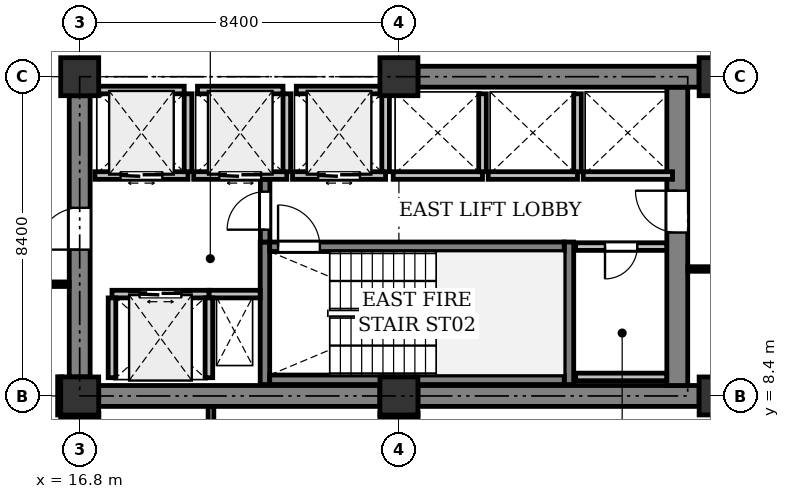
"""IFC4 building model, lengths in metres.
Left out: names, types, materials, properties, quantities, classifications, styles, units other than length and angle.
Written with IfcOpenShell. Run it as: python <this file> out.ifc"""

import sys

from ifc_helpers import new_model, si_unit, direction, frame, frame_2d, origin, origin_2d, place, context, subcontext, project, spatial, rectangle, extrude, element, fill, save


model = new_model("IFC4")
c1 = context("Model", 3, precision=1e-05, world=origin(), true_north=direction((0.0, 1.0)))
c2 = subcontext(c1, "Body", "Model", "MODEL_VIEW")
j1 = project(units=[si_unit("LENGTHUNIT", "METRE"), si_unit("PLANEANGLEUNIT", "RADIAN")], contexts=[c1])
p1 = place(None, origin())
s1 = spatial("IfcSite", under=j1, at=p1, CompositionType="ELEMENT")
p2 = place(p1, origin())
s2 = spatial("IfcBuilding", under=s1, at=p2, CompositionType="ELEMENT")
p3 = place(p2, frame((0.0, 0.0, 167.3)))
s3 = spatial("IfcBuildingStorey", under=s2, at=p3, CompositionType="ELEMENT", Elevation=167.3)
for number, where, z_axis, x_axis in (
    (1, (16.8, 8.4, 0.0), (0.0, 0.0, 1.0), (1.0, 0.0, 0.0)),
    (2, (16.8, 16.8, 0.0), (0.0, 0.0, 1.0), (1.0, 0.0, 0.0)),
    (3, (25.2, 8.4, 0.0), (0.0, 0.0, 1.0), (1.0, 0.0, 0.0)),
    (4, (25.2, 16.8, 0.0), (0.0, 0.0, 1.0), (1.0, 0.0, 0.0)),
    (5, (33.6, 8.4, 0.0), (0.0, 0.0, 1.0), (1.0, 0.0, 0.0)),
    (6, (33.6, 16.8, 0.0), (0.0, 0.0, 1.0), (1.0, 0.0, 0.0)),
):
    element("IfcColumn", number, at=place(p3, frame(where, z_axis=z_axis, x_axis=x_axis)), inside=s3, PredefinedType="COLUMN", context=c2, shape_type="SweptSolid", body=[
        extrude(rectangle(XDim=1.0, YDim=1.0, at=origin_2d()), origin(), (0.0, 0.0, 1.0), 4.1),
    ])
p4 = place(p3, frame((17.3, 8.4, 0.0), z_axis=(0.0, 0.0, 1.0), x_axis=(1.0, 0.0, 0.0)))
e7 = element("IfcWall", 7, at=p4, inside=s3, PredefinedType="SHEAR", context=c2, shape_type="SweptSolid", body=[
    extrude(rectangle(XDim=7.4, YDim=0.55, at=frame_2d((3.7, 0.0))), origin(), (0.0, 0.0, 1.0), 3.825),
])
p5 = place(p3, frame((25.7, 8.4, 0.0), z_axis=(0.0, 0.0, 1.0), x_axis=(1.0, 0.0, 0.0)))
e8 = element("IfcWall", 8, at=p5, inside=s3, PredefinedType="SHEAR", context=c2, shape_type="SweptSolid", body=[
    extrude(rectangle(XDim=7.4, YDim=0.55, at=frame_2d((3.7, 0.0))), origin(), (0.0, 0.0, 1.0), 3.825),
])
p6 = place(p3, frame((32.525, 8.675, 0.0), z_axis=(0.0, 0.0, 1.0), x_axis=(0.0, 1.0, 0.0)))
e9 = element("IfcWall", 9, at=p6, inside=s3, PredefinedType="SHEAR", context=c2, shape_type="SweptSolid", body=[
    extrude(rectangle(XDim=7.85, YDim=0.55, at=frame_2d((3.925, 0.0))), origin(), (0.0, 0.0, 1.0), 3.825),
])
p7 = place(p6, frame((4.025, 0.0, 0.0)))
e10 = element("IfcOpeningElement", 10, at=p7, cuts=e9, PredefinedType="OPENING", context=c2, shape_type="SweptSolid", body=[
    extrude(rectangle(XDim=1.1, YDim=2.15, at=frame_2d((0.55, 1.075))), frame((0.0, 0.285, 0.0), z_axis=(0.0, -1.0, 0.0), x_axis=(1.0, 0.0, 0.0)), (0.0, 0.0, 1.0), 0.57),
])
p8 = place(p3, frame((16.8, 8.9, 0.0), z_axis=(0.0, 0.0, 1.0), x_axis=(0.0, 1.0, 0.0)))
e11 = element("IfcWall", 11, at=p8, inside=s3, PredefinedType="SHEAR", context=c2, shape_type="SweptSolid", body=[
    extrude(rectangle(XDim=7.4, YDim=0.55, at=frame_2d((3.7, 0.0))), origin(), (0.0, 0.0, 1.0), 3.825),
])
p9 = place(p8, frame((3.35, 0.0, 0.0)))
e12 = element("IfcOpeningElement", 12, at=p9, cuts=e11, PredefinedType="OPENING", context=c2, shape_type="SweptSolid", body=[
    extrude(rectangle(XDim=1.1, YDim=2.15, at=frame_2d((0.55, 1.075))), frame((0.0, 0.285, 0.0), z_axis=(0.0, -1.0, 0.0), x_axis=(1.0, 0.0, 0.0)), (0.0, 0.0, 1.0), 0.57),
])
p10 = place(p3, frame((25.7, 16.8, 0.0), z_axis=(0.0, 0.0, 1.0), x_axis=(1.0, 0.0, 0.0)))
e13 = element("IfcWall", 13, at=p10, inside=s3, PredefinedType="SHEAR", context=c2, shape_type="SweptSolid", body=[
    extrude(rectangle(XDim=7.4, YDim=0.55, at=frame_2d((3.7, 0.0))), origin(), (0.0, 0.0, 1.0), 3.825),
])
for number, where, z_axis, x_axis in (
    (14, (21.675, 8.7, 0.0), (0.0, 0.0, 1.0), (0.0, 1.0, 0.0)),
    (15, (29.675, 8.7, 0.0), (0.0, 0.0, 1.0), (0.0, 1.0, 0.0)),
):
    element("IfcWall", number, at=place(p3, frame(where, z_axis=z_axis, x_axis=x_axis)), inside=s3, PredefinedType="SHEAR", context=c2, shape_type="SweptSolid", body=[
        extrude(rectangle(XDim=3.75, YDim=0.25, at=frame_2d((1.875, 0.0))), origin(), (0.0, 0.0, 1.0), 3.825),
    ])
p11 = place(p3, frame((21.8, 8.825, 0.0), z_axis=(0.0, 0.0, 1.0), x_axis=(1.0, 0.0, 0.0)))
e16 = element("IfcWall", 16, at=p11, inside=s3, PredefinedType="SHEAR", context=c2, shape_type="SweptSolid", body=[
    extrude(rectangle(XDim=7.75, YDim=0.25, at=frame_2d((3.875, 0.0))), origin(), (0.0, 0.0, 1.0), 3.825),
])
p12 = place(p3, frame((21.8, 12.325, 0.0), z_axis=(0.0, 0.0, 1.0), x_axis=(1.0, 0.0, 0.0)))
e17 = element("IfcWall", 17, at=p12, inside=s3, PredefinedType="SHEAR", context=c2, shape_type="SweptSolid", body=[
    extrude(rectangle(XDim=7.75, YDim=0.25, at=frame_2d((3.875, 0.0))), origin(), (0.0, 0.0, 1.0), 3.825),
])
p13 = place(p12, frame((0.22, 0.0, 0.0)))
e18 = element("IfcOpeningElement", 18, at=p13, cuts=e17, PredefinedType="OPENING", context=c2, shape_type="SweptSolid", body=[
    extrude(rectangle(XDim=1.1, YDim=2.15, at=frame_2d((0.55, 1.075))), frame((0.0, 0.135, 0.0), z_axis=(0.0, -1.0, 0.0), x_axis=(1.0, 0.0, 0.0)), (0.0, 0.0, 1.0), 0.27),
])
p14 = place(p3, frame((20.2, 11.08, 0.0), z_axis=(0.0, 0.0, 1.0), x_axis=(1.0, 0.0, 0.0)))
e19 = element("IfcWall", 19, at=p14, inside=s3, PredefinedType="PARTITIONING", context=c2, shape_type="SweptSolid", body=[
    extrude(rectangle(XDim=1.35, YDim=0.2, at=frame_2d((0.675, 0.0))), origin(), (0.0, 0.0, 1.0), 3.825),
])
p15 = place(p3, frame((21.68, 12.45, 0.0), z_axis=(0.0, 0.0, 1.0), x_axis=(0.0, 1.0, 0.0)))
e20 = element("IfcWall", 20, at=p15, inside=s3, PredefinedType="SHEAR", context=c2, shape_type="SweptSolid", body=[
    extrude(rectangle(XDim=1.65, YDim=0.25, at=frame_2d((0.825, 0.0))), origin(), (0.0, 0.0, 1.0), 3.825),
])
p16 = place(p15, frame((0.325, 0.0, 0.0)))
e21 = element("IfcOpeningElement", 21, at=p16, cuts=e20, PredefinedType="OPENING", context=c2, shape_type="SweptSolid", body=[
    extrude(rectangle(XDim=1.0, YDim=2.15, at=frame_2d((0.5, 1.075))), frame((0.0, 0.135, 0.0), z_axis=(0.0, -1.0, 0.0), x_axis=(1.0, 0.0, 0.0)), (0.0, 0.0, 1.0), 0.27),
])
p17 = place(p3, frame((17.65, 11.08, 0.0), z_axis=(0.0, 0.0, 1.0), x_axis=(1.0, 0.0, 0.0)))
e22 = element("IfcWall", 22, at=p17, inside=s3, PredefinedType="PARTITIONING", context=c2, shape_type="SweptSolid", body=[
    extrude(rectangle(XDim=2.55, YDim=0.2, at=frame_2d((1.275, 0.0))), origin(), (0.0, 0.0, 1.0), 3.825),
])
p18 = place(p17, frame((0.725, 0.0, 0.0)))
e23 = element("IfcOpeningElement", 23, at=p18, cuts=e22, PredefinedType="OPENING", context=c2, shape_type="SweptSolid", body=[
    extrude(rectangle(XDim=1.1, YDim=2.2, at=frame_2d((0.55, 1.1))), frame((0.0, 0.11, 0.0), z_axis=(0.0, -1.0, 0.0), x_axis=(1.0, 0.0, 0.0)), (0.0, 0.0, 1.0), 0.22),
])
for number, where, z_axis, x_axis in (
    (24, (20.2, 8.88, 0.0), (0.0, 0.0, 1.0), (0.0, 1.0, 0.0)),
    (25, (17.65, 8.88, 0.0), (0.0, 0.0, 1.0), (0.0, 1.0, 0.0)),
):
    element("IfcWall", number, at=place(p3, frame(where, z_axis=z_axis, x_axis=x_axis)), inside=s3, PredefinedType="PARTITIONING", context=c2, shape_type="SweptSolid", body=[
        extrude(rectangle(XDim=2.1, YDim=0.2, at=frame_2d((1.05, 0.0))), origin(), (0.0, 0.0, 1.0), 3.825),
    ])
p19 = place(p3, frame((17.2, 14.2, 0.0), z_axis=(0.0, 0.0, 1.0), x_axis=(1.0, 0.0, 0.0)))
e26 = element("IfcWall", 26, at=p19, inside=s3, PredefinedType="PARTITIONING", context=c2, shape_type="SweptSolid", body=[
    extrude(rectangle(XDim=2.45, YDim=0.2, at=frame_2d((1.225, 0.0))), origin(), (0.0, 0.0, 1.0), 3.825),
])
p20 = place(p19, frame((0.675, 0.0, 0.0)))
e27 = element("IfcOpeningElement", 27, at=p20, cuts=e26, PredefinedType="OPENING", context=c2, shape_type="SweptSolid", body=[
    extrude(rectangle(XDim=1.1, YDim=2.2, at=frame_2d((0.55, 1.1))), frame((0.0, 0.11, 0.0), z_axis=(0.0, -1.0, 0.0), x_axis=(1.0, 0.0, 0.0)), (0.0, 0.0, 1.0), 0.22),
])
p21 = place(p3, frame((19.65, 14.3, 0.0), z_axis=(0.0, 0.0, 1.0), x_axis=(0.0, 1.0, 0.0)))
e28 = element("IfcWall", 28, at=p21, inside=s3, PredefinedType="PARTITIONING", context=c2, shape_type="SweptSolid", body=[
    extrude(rectangle(XDim=2.05, YDim=0.2, at=frame_2d((1.025, 0.0))), origin(), (0.0, 0.0, 1.0), 3.825),
])
p22 = place(p3, frame((17.3, 16.45, 0.0), z_axis=(0.0, 0.0, 1.0), x_axis=(1.0, 0.0, 0.0)))
e29 = element("IfcWall", 29, at=p22, inside=s3, PredefinedType="PARTITIONING", context=c2, shape_type="SweptSolid", body=[
    extrude(rectangle(XDim=2.25, YDim=0.2, at=frame_2d((1.125, 0.0))), origin(), (0.0, 0.0, 1.0), 3.825),
])
p23 = place(p3, frame((19.8, 14.2, 0.0), z_axis=(0.0, 0.0, 1.0), x_axis=(1.0, 0.0, 0.0)))
e30 = element("IfcWall", 30, at=p23, inside=s3, PredefinedType="PARTITIONING", context=c2, shape_type="SweptSolid", body=[
    extrude(rectangle(XDim=2.45, YDim=0.2, at=frame_2d((1.225, 0.0))), origin(), (0.0, 0.0, 1.0), 3.825),
])
p24 = place(p23, frame((0.675, 0.0, 0.0)))
e31 = element("IfcOpeningElement", 31, at=p24, cuts=e30, PredefinedType="OPENING", context=c2, shape_type="SweptSolid", body=[
    extrude(rectangle(XDim=1.1, YDim=2.2, at=frame_2d((0.55, 1.1))), frame((0.0, 0.11, 0.0), z_axis=(0.0, -1.0, 0.0), x_axis=(1.0, 0.0, 0.0)), (0.0, 0.0, 1.0), 0.22),
])
p25 = place(p3, frame((22.25, 14.3, 0.0), z_axis=(0.0, 0.0, 1.0), x_axis=(0.0, 1.0, 0.0)))
e32 = element("IfcWall", 32, at=p25, inside=s3, PredefinedType="PARTITIONING", context=c2, shape_type="SweptSolid", body=[
    extrude(rectangle(XDim=2.05, YDim=0.2, at=frame_2d((1.025, 0.0))), origin(), (0.0, 0.0, 1.0), 3.825),
])
p26 = place(p3, frame((19.9, 16.45, 0.0), z_axis=(0.0, 0.0, 1.0), x_axis=(1.0, 0.0, 0.0)))
e33 = element("IfcWall", 33, at=p26, inside=s3, PredefinedType="PARTITIONING", context=c2, shape_type="SweptSolid", body=[
    extrude(rectangle(XDim=2.25, YDim=0.2, at=frame_2d((1.125, 0.0))), origin(), (0.0, 0.0, 1.0), 3.825),
])
p27 = place(p3, frame((22.4, 14.2, 0.0), z_axis=(0.0, 0.0, 1.0), x_axis=(1.0, 0.0, 0.0)))
e34 = element("IfcWall", 34, at=p27, inside=s3, PredefinedType="PARTITIONING", context=c2, shape_type="SweptSolid", body=[
    extrude(rectangle(XDim=2.45, YDim=0.2, at=frame_2d((1.225, 0.0))), origin(), (0.0, 0.0, 1.0), 3.825),
])
p28 = place(p27, frame((0.675, 0.0, 0.0)))
e35 = element("IfcOpeningElement", 35, at=p28, cuts=e34, PredefinedType="OPENING", context=c2, shape_type="SweptSolid", body=[
    extrude(rectangle(XDim=1.1, YDim=2.2, at=frame_2d((0.55, 1.1))), frame((0.0, 0.11, 0.0), z_axis=(0.0, -1.0, 0.0), x_axis=(1.0, 0.0, 0.0)), (0.0, 0.0, 1.0), 0.22),
])
p29 = place(p3, frame((24.85, 14.3, 0.0), z_axis=(0.0, 0.0, 1.0), x_axis=(0.0, 1.0, 0.0)))
e36 = element("IfcWall", 36, at=p29, inside=s3, PredefinedType="PARTITIONING", context=c2, shape_type="SweptSolid", body=[
    extrude(rectangle(XDim=2.05, YDim=0.2, at=frame_2d((1.025, 0.0))), origin(), (0.0, 0.0, 1.0), 3.825),
])
p30 = place(p3, frame((22.5, 16.45, 0.0), z_axis=(0.0, 0.0, 1.0), x_axis=(1.0, 0.0, 0.0)))
e37 = element("IfcWall", 37, at=p30, inside=s3, PredefinedType="PARTITIONING", context=c2, shape_type="SweptSolid", body=[
    extrude(rectangle(XDim=2.25, YDim=0.2, at=frame_2d((1.125, 0.0))), origin(), (0.0, 0.0, 1.0), 3.825),
])
p31 = place(p3, frame((25.05, 14.2, 0.0), z_axis=(0.0, 0.0, 1.0), x_axis=(1.0, 0.0, 0.0)))
e38 = element("IfcWall", 38, at=p31, inside=s3, PredefinedType="PARTITIONING", context=c2, shape_type="SweptSolid", body=[
    extrude(rectangle(XDim=2.35, YDim=0.2, at=frame_2d((1.175, 0.0))), origin(), (0.0, 0.0, 1.0), 3.825),
])
p32 = place(p3, frame((27.4, 14.3, 0.0), z_axis=(0.0, 0.0, 1.0), x_axis=(0.0, 1.0, 0.0)))
e39 = element("IfcWall", 39, at=p32, inside=s3, PredefinedType="PARTITIONING", context=c2, shape_type="SweptSolid", body=[
    extrude(rectangle(XDim=2.05, YDim=0.2, at=frame_2d((1.025, 0.0))), origin(), (0.0, 0.0, 1.0), 3.825),
])
p33 = place(p3, frame((27.55, 14.2, 0.0), z_axis=(0.0, 0.0, 1.0), x_axis=(1.0, 0.0, 0.0)))
e40 = element("IfcWall", 40, at=p33, inside=s3, PredefinedType="PARTITIONING", context=c2, shape_type="SweptSolid", body=[
    extrude(rectangle(XDim=2.35, YDim=0.2, at=frame_2d((1.175, 0.0))), origin(), (0.0, 0.0, 1.0), 3.825),
])
p34 = place(p3, frame((29.9, 14.3, 0.0), z_axis=(0.0, 0.0, 1.0), x_axis=(0.0, 1.0, 0.0)))
e41 = element("IfcWall", 41, at=p34, inside=s3, PredefinedType="PARTITIONING", context=c2, shape_type="SweptSolid", body=[
    extrude(rectangle(XDim=2.05, YDim=0.2, at=frame_2d((1.025, 0.0))), origin(), (0.0, 0.0, 1.0), 3.825),
])
p35 = place(p3, frame((30.05, 14.2, 0.0), z_axis=(0.0, 0.0, 1.0), x_axis=(1.0, 0.0, 0.0)))
e42 = element("IfcWall", 42, at=p35, inside=s3, PredefinedType="PARTITIONING", context=c2, shape_type="SweptSolid", body=[
    extrude(rectangle(XDim=2.35, YDim=0.2, at=frame_2d((1.175, 0.0))), origin(), (0.0, 0.0, 1.0), 3.825),
])
p36 = place(p3, frame((32.246, 12.33, 0.0), z_axis=(0.0, 0.0, 1.0), x_axis=(-1.0, 0.0, 0.0)))
e43 = element("IfcWall", 43, at=p36, inside=s3, PredefinedType="PARTITIONING", context=c2, shape_type="SweptSolid", body=[
    extrude(rectangle(XDim=2.396, YDim=0.2, at=frame_2d((1.198, 0.0))), origin(), (0.0, 0.0, 1.0), 3.825),
])
p37 = place(p36, frame((0.773, 0.0, 0.0)))
e44 = element("IfcOpeningElement", 44, at=p37, cuts=e43, PredefinedType="OPENING", context=c2, shape_type="SweptSolid", body=[
    extrude(rectangle(XDim=0.85, YDim=2.15, at=frame_2d((0.425, 1.075))), frame((0.0, 0.11, 0.0), z_axis=(0.0, -1.0, 0.0), x_axis=(1.0, 0.0, 0.0)), (0.0, 0.0, 1.0), 0.22),
])
p38 = place(p3, frame((29.85, 8.9, 0.0), z_axis=(0.0, 0.0, 1.0), x_axis=(1.0, 0.0, 0.0)))
e45 = element("IfcWall", 45, at=p38, inside=s3, PredefinedType="PARTITIONING", context=c2, shape_type="SweptSolid", body=[
    extrude(rectangle(XDim=2.396, YDim=0.2, at=frame_2d((1.198, 0.0))), origin(), (0.0, 0.0, 1.0), 3.825),
])
p39 = place(p3, frame((20.254, 0.124, 0.0), z_axis=(0.0, 0.0, 1.0), x_axis=(0.0, 1.0, 0.0)))
e46 = element("IfcWall", 46, at=p39, inside=s3, PredefinedType="PARTITIONING", context=c2, shape_type="SweptSolid", body=[
    extrude(rectangle(XDim=7.997, YDim=0.15, at=frame_2d((3.999, 0.0))), origin(), (0.0, 0.0, 1.0), 3.825),
])
p40 = place(p3, frame((17.304, 7.88, 0.0), z_axis=(0.0, 0.0, 1.0), x_axis=(-0.999999881717, -0.000486381265, 0.0)))
e47 = element("IfcWall", 47, at=p40, inside=s3, PredefinedType="PARTITIONING", context=c2, shape_type="SweptSolid", body=[
    extrude(rectangle(XDim=1.004, YDim=0.12, at=frame_2d((0.502, 0.0))), origin(), (0.0, 0.0, 1.0), 3.371),
])
p41 = place(p3, frame((16.28, 7.9, 0.0), z_axis=(0.0, 0.0, 1.0), x_axis=(0.000486381265, 0.999999881717, 0.0)))
e48 = element("IfcWall", 48, at=p41, inside=s3, PredefinedType="PARTITIONING", context=c2, shape_type="SweptSolid", body=[
    extrude(rectangle(XDim=1.004, YDim=0.12, at=frame_2d((0.502, 0.0))), origin(), (0.0, 0.0, 1.0), 2.425),
])
p42 = place(p3, frame((16.521, 11.34, 0.0), z_axis=(0.0, 0.0, 1.0), x_axis=(-1.0, 0.0, 0.0)))
e49 = element("IfcWall", 49, at=p42, inside=s3, PredefinedType="PARTITIONING", context=c2, shape_type="SweptSolid", body=[
    extrude(rectangle(XDim=2.121, YDim=0.12, at=frame_2d((1.061, 0.0))), origin(), (0.0, 0.0, 1.0), 3.825),
])
p43 = place(p3, frame((25.704, 7.88, 0.0), z_axis=(0.0, 0.0, 1.0), x_axis=(-0.999999881717, -0.000486381265, 0.0)))
e50 = element("IfcWall", 50, at=p43, inside=s3, PredefinedType="PARTITIONING", context=c2, shape_type="SweptSolid", body=[
    extrude(rectangle(XDim=1.004, YDim=0.12, at=frame_2d((0.502, 0.0))), origin(), (0.0, 0.0, 1.0), 3.371),
])
p44 = place(p3, frame((34.261, 11.74, 0.0), z_axis=(0.0, 0.0, 1.0), x_axis=(-1.0, 0.0, 0.0)))
e51 = element("IfcWall", 51, at=p44, inside=s3, PredefinedType="PARTITIONING", context=c2, shape_type="SweptSolid", body=[
    extrude(rectangle(XDim=1.457, YDim=0.12, at=frame_2d((0.729, 0.0))), origin(), (0.0, 0.0, 1.0), 3.371),
])
p45 = place(p7, origin())
e52 = element("IfcDoor", 52, at=p45, inside=s3, OperationType="SINGLE_SWING_RIGHT", PredefinedType="DOOR", context=c2, shape_type="SweptSolid", body=[
    extrude(rectangle(XDim=1.1, YDim=2.15, at=frame_2d((0.55, 1.075))), frame((0.0, 0.025, 0.0), z_axis=(0.0, -1.0, 0.0), x_axis=(1.0, 0.0, 0.0)), (0.0, 0.0, 1.0), 0.05),
])
fill(e10, e52)
p46 = place(p9, origin())
e53 = element("IfcDoor", 53, at=p46, inside=s3, OperationType="SINGLE_SWING_LEFT", PredefinedType="DOOR", context=c2, shape_type="SweptSolid", body=[
    extrude(rectangle(XDim=1.1, YDim=2.15, at=frame_2d((0.55, 1.075))), frame((0.0, 0.025, 0.0), z_axis=(0.0, -1.0, 0.0), x_axis=(1.0, 0.0, 0.0)), (0.0, 0.0, 1.0), 0.05),
])
fill(e12, e53)
p47 = place(p13, origin())
e54 = element("IfcDoor", 54, at=p47, inside=s3, OperationType="SINGLE_SWING_LEFT", PredefinedType="DOOR", context=c2, shape_type="SweptSolid", body=[
    extrude(rectangle(XDim=1.1, YDim=2.15, at=frame_2d((0.55, 1.075))), frame((0.0, 0.025, 0.0), z_axis=(0.0, -1.0, 0.0), x_axis=(1.0, 0.0, 0.0)), (0.0, 0.0, 1.0), 0.05),
])
fill(e18, e54)
p48 = place(p16, origin())
e55 = element("IfcDoor", 55, at=p48, inside=s3, OperationType="SINGLE_SWING_LEFT", PredefinedType="DOOR", context=c2, shape_type="SweptSolid", body=[
    extrude(rectangle(XDim=1.0, YDim=2.15, at=frame_2d((0.5, 1.075))), frame((0.0, 0.025, 0.0), z_axis=(0.0, -1.0, 0.0), x_axis=(1.0, 0.0, 0.0)), (0.0, 0.0, 1.0), 0.05),
])
fill(e21, e55)
p49 = place(p18, origin())
e56 = element("IfcDoor", 56, at=p49, inside=s3, OperationType="DOUBLE_DOOR_SLIDING", PredefinedType="DOOR", context=c2, shape_type="SweptSolid", body=[
    extrude(rectangle(XDim=1.1, YDim=2.2, at=frame_2d((0.55, 1.1))), frame((0.0, 0.025, 0.0), z_axis=(0.0, -1.0, 0.0), x_axis=(1.0, 0.0, 0.0)), (0.0, 0.0, 1.0), 0.05),
])
fill(e23, e56)
p50 = place(p20, origin())
e57 = element("IfcDoor", 57, at=p50, inside=s3, OperationType="DOUBLE_DOOR_SLIDING", PredefinedType="DOOR", context=c2, shape_type="SweptSolid", body=[
    extrude(rectangle(XDim=1.1, YDim=2.2, at=frame_2d((0.55, 1.1))), frame((0.0, 0.025, 0.0), z_axis=(0.0, -1.0, 0.0), x_axis=(1.0, 0.0, 0.0)), (0.0, 0.0, 1.0), 0.05),
])
fill(e27, e57)
p51 = place(p24, origin())
e58 = element("IfcDoor", 58, at=p51, inside=s3, OperationType="DOUBLE_DOOR_SLIDING", PredefinedType="DOOR", context=c2, shape_type="SweptSolid", body=[
    extrude(rectangle(XDim=1.1, YDim=2.2, at=frame_2d((0.55, 1.1))), frame((0.0, 0.025, 0.0), z_axis=(0.0, -1.0, 0.0), x_axis=(1.0, 0.0, 0.0)), (0.0, 0.0, 1.0), 0.05),
])
fill(e31, e58)
p52 = place(p28, origin())
e59 = element("IfcDoor", 59, at=p52, inside=s3, OperationType="DOUBLE_DOOR_SLIDING", PredefinedType="DOOR", context=c2, shape_type="SweptSolid", body=[
    extrude(rectangle(XDim=1.1, YDim=2.2, at=frame_2d((0.55, 1.1))), frame((0.0, 0.025, 0.0), z_axis=(0.0, -1.0, 0.0), x_axis=(1.0, 0.0, 0.0)), (0.0, 0.0, 1.0), 0.05),
])
fill(e35, e59)
p53 = place(p37, origin())
e60 = element("IfcDoor", 60, at=p53, inside=s3, OperationType="SINGLE_SWING_RIGHT", PredefinedType="DOOR", context=c2, shape_type="SweptSolid", body=[
    extrude(rectangle(XDim=0.85, YDim=2.15, at=frame_2d((0.425, 1.075))), frame((0.0, 0.025, 0.0), z_axis=(0.0, -1.0, 0.0), x_axis=(1.0, 0.0, 0.0)), (0.0, 0.0, 1.0), 0.05),
])
fill(e44, e60)
save(model, sys.argv[1])
